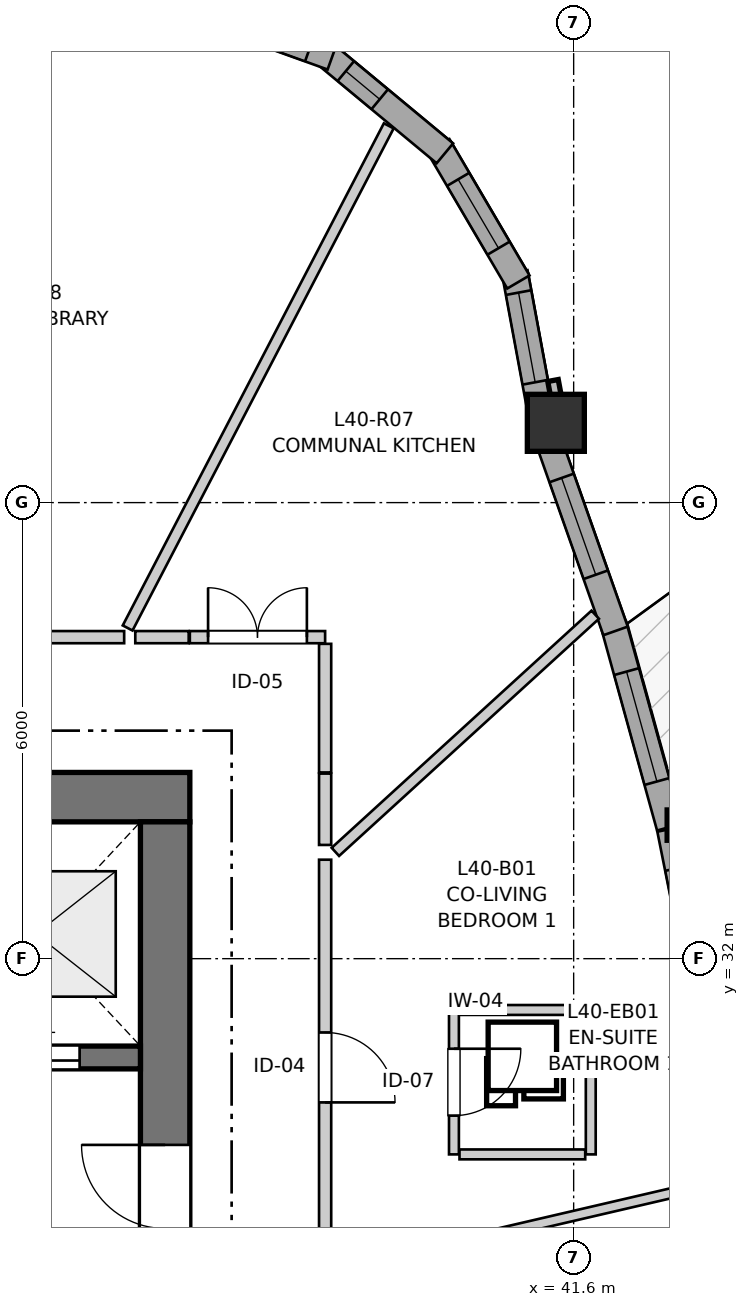
"""IFC4 building model, lengths in metres.
Left out: names, types, materials, properties, quantities, classifications, styles, units other than length and angle.
Written with IfcOpenShell. Run it as: python <this file> out.ifc"""

import sys

from ifc_helpers import new_model, si_unit, direction, frame, frame_2d, origin, origin_2d, place, context, subcontext, project, spatial, rectangle, i_section, extrude, source, transform, mapped, element, fill, save


model = new_model("IFC4")
c1 = context("Model", 3, precision=1e-05, world=origin(), true_north=direction((0.0, 1.0)))
c2 = subcontext(c1, "Body", "Model", "MODEL_VIEW")
j1 = project(units=[si_unit("LENGTHUNIT", "METRE"), si_unit("PLANEANGLEUNIT", "RADIAN")], contexts=[c1])
p1 = place(None, origin())
s1 = spatial("IfcSite", under=j1, at=p1, CompositionType="ELEMENT")
p2 = place(p1, origin())
s2 = spatial("IfcBuilding", under=s1, at=p2, CompositionType="ELEMENT")
p3 = place(p2, frame((0.0, 0.0, 136.2)))
s3 = spatial("IfcBuildingStorey", under=s2, at=p3, CompositionType="ELEMENT", Elevation=136.2)
p4 = place(p3, frame((36.55, 34.125, 0.0), z_axis=(0.0, 0.0, 1.0), x_axis=(-1.0, 0.0, 0.0)))
e1 = element("IfcWall", 1, at=p4, inside=s3, PredefinedType="SHEAR", context=c2, shape_type="SweptSolid", body=[
    extrude(rectangle(XDim=12.4, YDim=0.65, at=frame_2d((6.2, 0.0))), origin(), (0.0, 0.0, 1.0), 2.95),
])
p5 = place(p3, frame((36.225, 18.2, 0.0), z_axis=(0.0, 0.0, 1.0), x_axis=(0.0, 1.0, 0.0)))
e2 = element("IfcWall", 2, at=p5, inside=s3, PredefinedType="SHEAR", context=c2, shape_type="SweptSolid", body=[
    extrude(rectangle(XDim=15.6, YDim=0.65, at=frame_2d((7.8, 0.0))), origin(), (0.0, 0.0, 1.0), 2.95),
])
p6 = place(p5, frame((4.25, 0.0, 0.0)))
e3 = element("IfcOpeningElement", 3, at=p6, cuts=e2, PredefinedType="OPENING", context=c2, shape_type="SweptSolid", body=[
    extrude(rectangle(XDim=1.1, YDim=2.15, at=frame_2d((0.55, 1.075))), frame((0.0, 0.335, 0.0), z_axis=(0.0, -1.0, 0.0), x_axis=(1.0, 0.0, 0.0)), (0.0, 0.0, 1.0), 0.67),
])
p7 = place(p5, frame((10.25, 0.0, 0.0)))
e4 = element("IfcOpeningElement", 4, at=p7, cuts=e2, PredefinedType="OPENING", context=c2, shape_type="SweptSolid", body=[
    extrude(rectangle(XDim=1.1, YDim=2.15, at=frame_2d((0.55, 1.075))), frame((0.0, 0.335, 0.0), z_axis=(0.0, -1.0, 0.0), x_axis=(1.0, 0.0, 0.0)), (0.0, 0.0, 1.0), 0.67),
])
p8 = place(p3, frame((24.8, 30.7, 0.0), z_axis=(0.0, 0.0, 1.0), x_axis=(1.0, 0.0, 0.0)))
e5 = element("IfcWall", 5, at=p8, inside=s3, PredefinedType="SHEAR", context=c2, shape_type="SweptSolid", body=[
    extrude(rectangle(XDim=11.1, YDim=0.3, at=frame_2d((5.55, 0.0))), origin(), (0.0, 0.0, 1.0), 2.95),
])
p9 = place(p8, frame((6.22, 0.0, 0.0)))
e6 = element("IfcOpeningElement", 6, at=p9, cuts=e5, PredefinedType="OPENING", context=c2, shape_type="SweptSolid", body=[
    extrude(rectangle(XDim=0.98, YDim=2.15, at=frame_2d((0.49, 1.075))), frame((0.0, 0.16, 0.0), z_axis=(0.0, -1.0, 0.0), x_axis=(1.0, 0.0, 0.0)), (0.0, 0.0, 1.0), 0.32),
])
p10 = place(p8, frame((9.15, 0.0, 0.0)))
e7 = element("IfcOpeningElement", 7, at=p10, cuts=e5, PredefinedType="OPENING", context=c2, shape_type="SweptSolid", body=[
    extrude(rectangle(XDim=1.15, YDim=2.15, at=frame_2d((0.575, 1.075))), frame((0.0, 0.16, 0.0), z_axis=(0.0, -1.0, 0.0), x_axis=(1.0, 0.0, 0.0)), (0.0, 0.0, 1.0), 0.32),
])
m1 = source(origin(), c2, "Body", "SweptSolid", [
    extrude(i_section(OverallWidth=0.401, OverallDepth=0.399, WebThickness=0.023, FlangeThickness=0.036, FilletRadius=0.015, at=origin_2d()), origin(), (0.0, 0.0, 1.0), 2.95),
])
p11 = place(p3, frame((43.031, 33.757, 0.0), z_axis=(0.0, 0.0, 1.0), x_axis=(1.0, 0.0, 0.0)))
e8 = element("IfcColumn", 8, at=p11, inside=s3, PredefinedType="PILASTER", context=c2, shape_type="MappedRepresentation", body=[
    mapped(m1, transform((0.0, 0.0, 0.0), x_axis=(1.0, 0.0, 0.0), y_axis=(0.0, 1.0, 0.0), z_axis=(0.0, 0.0, 1.0), scale=1.0)),
])
m2 = source(origin(), c2, "Body", "SweptSolid", [
    extrude(rectangle(XDim=0.75, YDim=0.75, at=origin_2d()), origin(), (0.0, 0.0, 1.0), 2.95),
])
p12 = place(p3, frame((41.365, 39.05, 0.0), z_axis=(0.0, 0.0, 1.0), x_axis=(1.0, 0.0, 0.0)))
e9 = element("IfcColumn", 9, at=p12, inside=s3, PredefinedType="COLUMN", context=c2, shape_type="MappedRepresentation", body=[
    mapped(m2, transform((0.0, 0.0, 0.0), x_axis=(1.0, 0.0, 0.0), y_axis=(0.0, 1.0, 0.0), z_axis=(0.0, 0.0, 1.0), scale=1.0)),
])
p13 = place(p3, frame((43.401, 31.037, 0.0), z_axis=(0.0, 0.0, 1.0), x_axis=(-0.196047084538, 0.980594483283, 0.0)))
e10 = element("IfcWall", 10, at=p13, inside=s3, PredefinedType="SOLIDWALL", context=c2, shape_type="SweptSolid", body=[
    extrude(rectangle(XDim=2.72, YDim=0.34, at=frame_2d((1.36, 0.0))), origin(), (0.0, 0.0, 1.0), 2.53),
])
p14 = place(p13, frame((0.545, 0.0, 0.82)))
e11 = element("IfcOpeningElement", 11, at=p14, cuts=e10, PredefinedType="OPENING", context=c2, shape_type="SweptSolid", body=[
    extrude(rectangle(XDim=1.65, YDim=1.45, at=frame_2d((0.825, 0.725))), frame((0.0, 0.18, 0.0), z_axis=(0.0, -1.0, 0.0), x_axis=(1.0, 0.0, 0.0)), (0.0, 0.0, 1.0), 0.36),
])
p15 = place(p3, frame((42.861, 33.731, 0.0), z_axis=(0.0, 0.0, 1.0), x_axis=(-0.266277078362, 0.96389652844, 0.0)))
e12 = element("IfcWall", 12, at=p15, inside=s3, PredefinedType="SOLIDWALL", context=c2, shape_type="SweptSolid", body=[
    extrude(rectangle(XDim=2.764, YDim=0.34, at=frame_2d((1.382, 0.0))), origin(), (0.0, 0.0, 1.0), 2.53),
])
p16 = place(p15, frame((0.622, 0.0, 0.82)))
e13 = element("IfcOpeningElement", 13, at=p16, cuts=e12, PredefinedType="OPENING", context=c2, shape_type="SweptSolid", body=[
    extrude(rectangle(XDim=1.5, YDim=1.45, at=frame_2d((0.75, 0.725))), frame((0.0, 0.18, 0.0), z_axis=(0.0, -1.0, 0.0), x_axis=(1.0, 0.0, 0.0)), (0.0, 0.0, 1.0), 0.36),
])
p17 = place(p3, frame((42.151, 36.312, 0.0), z_axis=(0.0, 0.0, 1.0), x_axis=(-0.332691841861, 0.94303559761, 0.0)))
e14 = element("IfcWall", 14, at=p17, inside=s3, PredefinedType="SOLIDWALL", context=c2, shape_type="SweptSolid", body=[
    extrude(rectangle(XDim=2.688, YDim=0.34, at=frame_2d((1.344, 0.0))), origin(), (0.0, 0.0, 1.0), 2.53),
])
p18 = place(p17, frame((0.784, 0.0, 0.82)))
e15 = element("IfcOpeningElement", 15, at=p18, cuts=e14, PredefinedType="OPENING", context=c2, shape_type="SweptSolid", body=[
    extrude(rectangle(XDim=1.35, YDim=1.45, at=frame_2d((0.675, 0.725))), frame((0.0, 0.18, 0.0), z_axis=(0.0, -1.0, 0.0), x_axis=(1.0, 0.0, 0.0)), (0.0, 0.0, 1.0), 0.36),
])
p19 = place(p3, frame((41.17, 39.171, 0.0), z_axis=(0.0, 0.0, 1.0), x_axis=(-0.182297593262, 0.983243401956, 0.0)))
e16 = element("IfcWall", 16, at=p19, inside=s3, PredefinedType="SOLIDWALL", context=c2, shape_type="SweptSolid", body=[
    extrude(rectangle(XDim=1.888, YDim=0.34, at=frame_2d((0.944, 0.0))), origin(), (0.0, 0.0, 1.0), 2.53),
])
p20 = place(p19, frame((0.419, 0.0, 0.82)))
e17 = element("IfcOpeningElement", 17, at=p20, cuts=e16, PredefinedType="OPENING", context=c2, shape_type="SweptSolid", body=[
    extrude(rectangle(XDim=1.2, YDim=1.45, at=frame_2d((0.6, 0.725))), frame((0.0, 0.18, 0.0), z_axis=(0.0, -1.0, 0.0), x_axis=(1.0, 0.0, 0.0)), (0.0, 0.0, 1.0), 0.36),
])
p21 = place(p3, frame((40.873, 40.902, 0.0), z_axis=(0.0, 0.0, 1.0), x_axis=(-0.506225227923, 0.862401309493, 0.0)))
e18 = element("IfcWall", 18, at=p21, inside=s3, PredefinedType="SOLIDWALL", context=c2, shape_type="SweptSolid", body=[
    extrude(rectangle(XDim=2.081, YDim=0.34, at=frame_2d((1.041, 0.0))), origin(), (0.0, 0.0, 1.0), 2.53),
])
p22 = place(p21, frame((0.516, 0.0, 0.82)))
e19 = element("IfcOpeningElement", 19, at=p22, cuts=e18, PredefinedType="OPENING", context=c2, shape_type="SweptSolid", body=[
    extrude(rectangle(XDim=1.05, YDim=1.45, at=frame_2d((0.525, 0.725))), frame((0.0, 0.18, 0.0), z_axis=(0.0, -1.0, 0.0), x_axis=(1.0, 0.0, 0.0)), (0.0, 0.0, 1.0), 0.36),
])
p23 = place(p3, frame((39.906, 42.595, 0.0), z_axis=(0.0, 0.0, 1.0), x_axis=(-0.769584999316, 0.638544382817, 0.0)))
e20 = element("IfcWall", 20, at=p23, inside=s3, PredefinedType="SOLIDWALL", context=c2, shape_type="SweptSolid", body=[
    extrude(rectangle(XDim=2.081, YDim=0.34, at=frame_2d((1.041, 0.0))), origin(), (0.0, 0.0, 1.0), 2.53),
])
p24 = place(p23, frame((1.114, 0.0, 0.82)))
e21 = element("IfcOpeningElement", 21, at=p24, cuts=e20, PredefinedType="OPENING", context=c2, shape_type="SweptSolid", body=[
    extrude(rectangle(XDim=0.58, YDim=1.35, at=frame_2d((0.29, 0.675))), frame((0.0, 0.18, 0.0), z_axis=(0.0, -1.0, 0.0), x_axis=(1.0, 0.0, 0.0)), (0.0, 0.0, 1.0), 0.36),
])
p25 = place(p3, frame((38.42, 43.858, 0.0), z_axis=(0.0, 0.0, 1.0), x_axis=(-0.941071215914, 0.338208466153, 0.0)))
e22 = element("IfcWall", 22, at=p25, inside=s3, PredefinedType="SOLIDWALL", context=c2, shape_type="SweptSolid", body=[
    extrude(rectangle(XDim=2.081, YDim=0.34, at=frame_2d((1.041, 0.0))), origin(), (0.0, 0.0, 1.0), 2.53),
])
p26 = place(p25, frame((0.316, 0.0, 0.82)))
e23 = element("IfcOpeningElement", 23, at=p26, cuts=e22, PredefinedType="OPENING", context=c2, shape_type="SweptSolid", body=[
    extrude(rectangle(XDim=1.45, YDim=1.25, at=frame_2d((0.725, 0.625))), frame((0.0, 0.18, 0.0), z_axis=(0.0, -1.0, 0.0), x_axis=(1.0, 0.0, 0.0)), (0.0, 0.0, 1.0), 0.36),
])
p27 = place(p3, frame((30.078, 36.23, 0.0), z_axis=(0.0, 0.0, 1.0), x_axis=(1.0, 0.0, 0.0)))
e24 = element("IfcWall", 24, at=p27, inside=s3, PredefinedType="PARTITIONING", context=c2, shape_type="SweptSolid", body=[
    extrude(rectangle(XDim=5.608, YDim=0.16, at=frame_2d((2.804, 0.0))), origin(), (0.0, 0.0, 1.0), 2.588),
])
p28 = place(p27, frame((2.323, 0.0, 0.0)))
e25 = element("IfcOpeningElement", 25, at=p28, cuts=e24, PredefinedType="OPENING", context=c2, shape_type="SweptSolid", body=[
    extrude(rectangle(XDim=0.96, YDim=2.1, at=frame_2d((0.48, 1.05))), frame((0.0, 0.09, 0.0), z_axis=(0.0, -1.0, 0.0), x_axis=(1.0, 0.0, 0.0)), (0.0, 0.0, 1.0), 0.18),
])
p29 = place(p3, frame((38.33, 33.302, 0.0), z_axis=(0.0, 0.0, 1.0), x_axis=(0.0, -1.0, 0.0)))
e26 = element("IfcWall", 26, at=p29, inside=s3, PredefinedType="PARTITIONING", context=c2, shape_type="SweptSolid", body=[
    extrude(rectangle(XDim=5.462, YDim=0.16, at=frame_2d((2.731, 0.0))), origin(), (0.0, 0.0, 1.0), 2.588),
])
p30 = place(p29, frame((2.273, 0.0, 0.0)))
e27 = element("IfcOpeningElement", 27, at=p30, cuts=e26, PredefinedType="OPENING", context=c2, shape_type="SweptSolid", body=[
    extrude(rectangle(XDim=0.92, YDim=2.1, at=frame_2d((0.46, 1.05))), frame((0.0, 0.09, 0.0), z_axis=(0.0, -1.0, 0.0), x_axis=(1.0, 0.0, 0.0)), (0.0, 0.0, 1.0), 0.18),
])
p31 = place(p3, frame((40.025, 31.325, 0.0), z_axis=(0.0, 0.0, 1.0), x_axis=(0.0, -1.0, 0.0)))
e28 = element("IfcWall", 28, at=p31, inside=s3, PredefinedType="PARTITIONING", context=c2, shape_type="SweptSolid", body=[
    extrude(rectangle(XDim=1.9, YDim=0.13, at=frame_2d((0.95, 0.0))), origin(), (0.0, 0.0, 1.0), 2.95),
])
p32 = place(p31, frame((0.51, 0.0, 0.0)))
e29 = element("IfcOpeningElement", 29, at=p32, cuts=e28, PredefinedType="OPENING", context=c2, shape_type="SweptSolid", body=[
    extrude(rectangle(XDim=0.88, YDim=2.05, at=frame_2d((0.44, 1.025))), frame((0.0, 0.075, 0.0), z_axis=(0.0, -1.0, 0.0), x_axis=(1.0, 0.0, 0.0)), (0.0, 0.0, 1.0), 0.15),
])
p33 = place(p3, frame((36.55, 36.23, 0.0), z_axis=(0.0, 0.0, 1.0), x_axis=(1.0, 0.0, 0.0)))
e30 = element("IfcWall", 30, at=p33, inside=s3, PredefinedType="PARTITIONING", context=c2, shape_type="SweptSolid", body=[
    extrude(rectangle(XDim=1.78, YDim=0.16, at=frame_2d((0.89, 0.0))), origin(), (0.0, 0.0, 1.0), 2.95),
])
p34 = place(p33, frame((0.24, 0.0, 0.0)))
e31 = element("IfcOpeningElement", 31, at=p34, cuts=e30, PredefinedType="OPENING", context=c2, shape_type="SweptSolid", body=[
    extrude(rectangle(XDim=1.3, YDim=2.1, at=frame_2d((0.65, 1.05))), frame((0.0, 0.09, 0.0), z_axis=(0.0, -1.0, 0.0), x_axis=(1.0, 0.0, 0.0)), (0.0, 0.0, 1.0), 0.18),
])
p35 = place(p3, frame((35.732, 36.351, 0.0), z_axis=(0.0, 0.0, 1.0), x_axis=(0.461386804, 0.887199085378, 0.0)))
e32 = element("IfcWall", 32, at=p35, inside=s3, PredefinedType="PARTITIONING", context=c2, shape_type="SweptSolid", body=[
    extrude(rectangle(XDim=7.446, YDim=0.145, at=frame_2d((3.723, 0.0))), origin(), (0.0, 0.0, 1.0), 2.95),
])
p36 = place(p3, frame((38.433, 27.88, 0.0), z_axis=(0.0, 0.0, 1.0), x_axis=(0.974013368575, 0.226490524828, 0.0)))
e33 = element("IfcWall", 33, at=p36, inside=s3, PredefinedType="PARTITIONING", context=c2, shape_type="SweptSolid", body=[
    extrude(rectangle(XDim=5.159, YDim=0.13, at=frame_2d((2.58, 0.0))), origin(), (0.0, 0.0, 1.0), 2.95),
])
p37 = place(p3, frame((38.465, 33.405, 0.0), z_axis=(0.0, 0.0, 1.0), x_axis=(0.738623645331, 0.674118024205, 0.0)))
e34 = element("IfcWall", 34, at=p37, inside=s3, PredefinedType="PARTITIONING", context=c2, shape_type="SweptSolid", body=[
    extrude(rectangle(XDim=4.629, YDim=0.145, at=frame_2d((2.314, 0.0))), origin(), (0.0, 0.0, 1.0), 2.95),
])
p38 = place(p3, frame((41.825, 29.425, 0.0), z_axis=(0.0, 0.0, 1.0), x_axis=(0.0, 1.0, 0.0)))
e35 = element("IfcWall", 35, at=p38, inside=s3, PredefinedType="PARTITIONING", context=c2, shape_type="SweptSolid", body=[
    extrude(rectangle(XDim=1.9, YDim=0.13, at=frame_2d((0.95, 0.0))), origin(), (0.0, 0.0, 1.0), 2.95),
])
for number, where, z_axis, x_axis in (
    (36, (40.098, 31.325, 0.0), (0.0, 0.0, 1.0), (1.0, 0.0, 0.0)),
    (37, (40.098, 29.425, 0.0), (0.0, 0.0, 1.0), (1.0, 0.0, 0.0)),
):
    element("IfcWall", number, at=place(p3, frame(where, z_axis=z_axis, x_axis=x_axis)), inside=s3, PredefinedType="PARTITIONING", context=c2, shape_type="SweptSolid", body=[
        extrude(rectangle(XDim=1.654, YDim=0.13, at=frame_2d((0.827, 0.0))), origin(), (0.0, 0.0, 1.0), 2.95),
    ])
p39 = place(p3, frame((38.33, 34.45, 0.0), z_axis=(0.0, 0.0, 1.0), x_axis=(0.0, 1.0, 0.0)))
e38 = element("IfcWall", 38, at=p39, inside=s3, PredefinedType="PARTITIONING", context=c2, shape_type="SweptSolid", body=[
    extrude(rectangle(XDim=1.692, YDim=0.16, at=frame_2d((0.846, 0.0))), origin(), (0.0, 0.0, 1.0), 2.588),
])
p40 = place(p3, frame((38.33, 33.496, 0.0), z_axis=(0.0, 0.0, 1.0), x_axis=(0.0, 1.0, 0.0)))
e39 = element("IfcWall", 39, at=p40, inside=s3, PredefinedType="PARTITIONING", context=c2, shape_type="SweptSolid", body=[
    extrude(rectangle(XDim=0.939, YDim=0.16, at=frame_2d((0.469, 0.0))), origin(), (0.0, 0.0, 1.0), 2.588),
])
p41 = place(p3, frame((35.832, 36.23, 0.0), z_axis=(0.0, 0.0, 1.0), x_axis=(1.0, 0.0, 0.0)))
e40 = element("IfcWall", 40, at=p41, inside=s3, PredefinedType="PARTITIONING", context=c2, shape_type="SweptSolid", body=[
    extrude(rectangle(XDim=0.703, YDim=0.16, at=frame_2d((0.351, 0.0))), origin(), (0.0, 0.0, 1.0), 2.95),
])
m3 = source(origin(), c2, "Body", "SweptSolid", [
    extrude(rectangle(XDim=1.5, YDim=1.45, at=frame_2d((0.75, 0.725))), frame((0.0, 0.03, 0.0), z_axis=(0.0, -1.0, 0.0), x_axis=(1.0, 0.0, 0.0)), (0.0, 0.0, 1.0), 0.06),
])
p42 = place(p16, origin())
e41 = element("IfcWindow", 41, at=p42, inside=s3, PartitioningType="SINGLE_PANEL", PredefinedType="WINDOW", context=c2, shape_type="MappedRepresentation", body=[
    mapped(m3, transform((0.0, 0.0, 0.0), x_axis=(1.0, 0.0, 0.0), y_axis=(0.0, 1.0, 0.0), z_axis=(0.0, 0.0, 1.0), scale=1.0)),
])
fill(e13, e41)
m4 = source(origin(), c2, "Body", "SweptSolid", [
    extrude(rectangle(XDim=1.35, YDim=1.45, at=frame_2d((0.675, 0.725))), frame((0.0, 0.03, 0.0), z_axis=(0.0, -1.0, 0.0), x_axis=(1.0, 0.0, 0.0)), (0.0, 0.0, 1.0), 0.06),
])
p43 = place(p18, origin())
e42 = element("IfcWindow", 42, at=p43, inside=s3, PartitioningType="SINGLE_PANEL", PredefinedType="WINDOW", context=c2, shape_type="MappedRepresentation", body=[
    mapped(m4, transform((0.0, 0.0, 0.0), x_axis=(1.0, 0.0, 0.0), y_axis=(0.0, 1.0, 0.0), z_axis=(0.0, 0.0, 1.0), scale=1.0)),
])
fill(e15, e42)
m5 = source(origin(), c2, "Body", "SweptSolid", [
    extrude(rectangle(XDim=1.2, YDim=1.45, at=frame_2d((0.6, 0.725))), frame((0.0, 0.03, 0.0), z_axis=(0.0, -1.0, 0.0), x_axis=(1.0, 0.0, 0.0)), (0.0, 0.0, 1.0), 0.06),
])
p44 = place(p20, origin())
e43 = element("IfcWindow", 43, at=p44, inside=s3, PartitioningType="SINGLE_PANEL", PredefinedType="WINDOW", context=c2, shape_type="MappedRepresentation", body=[
    mapped(m5, transform((0.0, 0.0, 0.0), x_axis=(1.0, 0.0, 0.0), y_axis=(0.0, 1.0, 0.0), z_axis=(0.0, 0.0, 1.0), scale=1.0)),
])
fill(e17, e43)
m6 = source(origin(), c2, "Body", "SweptSolid", [
    extrude(rectangle(XDim=1.05, YDim=1.45, at=frame_2d((0.525, 0.725))), frame((0.0, 0.03, 0.0), z_axis=(0.0, -1.0, 0.0), x_axis=(1.0, 0.0, 0.0)), (0.0, 0.0, 1.0), 0.06),
])
p45 = place(p22, origin())
e44 = element("IfcWindow", 44, at=p45, inside=s3, PartitioningType="SINGLE_PANEL", PredefinedType="WINDOW", context=c2, shape_type="MappedRepresentation", body=[
    mapped(m6, transform((0.0, 0.0, 0.0), x_axis=(1.0, 0.0, 0.0), y_axis=(0.0, 1.0, 0.0), z_axis=(0.0, 0.0, 1.0), scale=1.0)),
])
fill(e19, e44)
m7 = source(origin(), c2, "Body", "SweptSolid", [
    extrude(rectangle(XDim=0.58, YDim=1.35, at=frame_2d((0.29, 0.675))), frame((0.0, 0.03, 0.0), z_axis=(0.0, -1.0, 0.0), x_axis=(1.0, 0.0, 0.0)), (0.0, 0.0, 1.0), 0.06),
])
p46 = place(p24, origin())
e45 = element("IfcWindow", 45, at=p46, inside=s3, PartitioningType="SINGLE_PANEL", PredefinedType="WINDOW", context=c2, shape_type="MappedRepresentation", body=[
    mapped(m7, transform((0.0, 0.0, 0.0), x_axis=(1.0, 0.0, 0.0), y_axis=(0.0, 1.0, 0.0), z_axis=(0.0, 0.0, 1.0), scale=1.0)),
])
fill(e21, e45)
m8 = source(origin(), c2, "Body", "SweptSolid", [
    extrude(rectangle(XDim=1.15, YDim=2.15, at=frame_2d((0.575, 1.075))), frame((0.0, 0.025, 0.0), z_axis=(0.0, -1.0, 0.0), x_axis=(1.0, 0.0, 0.0)), (0.0, 0.0, 1.0), 0.05),
])
p47 = place(p10, origin())
e46 = element("IfcDoor", 46, at=p47, inside=s3, OperationType="DOUBLE_DOOR_SLIDING", PredefinedType="DOOR", context=c2, shape_type="MappedRepresentation", body=[
    mapped(m8, transform((0.0, 0.0, 0.0), x_axis=(1.0, 0.0, 0.0), y_axis=(0.0, 1.0, 0.0), z_axis=(0.0, 0.0, 1.0), scale=1.0)),
])
fill(e7, e46)
m9 = source(origin(), c2, "Body", "SweptSolid", [
    extrude(rectangle(XDim=1.1, YDim=2.15, at=frame_2d((0.55, 1.075))), frame((0.0, 0.025, 0.0), z_axis=(0.0, -1.0, 0.0), x_axis=(1.0, 0.0, 0.0)), (0.0, 0.0, 1.0), 0.05),
])
p48 = place(p7, origin())
e47 = element("IfcDoor", 47, at=p48, inside=s3, OperationType="SINGLE_SWING_RIGHT", PredefinedType="DOOR", context=c2, shape_type="MappedRepresentation", body=[
    mapped(m9, transform((0.0, 0.0, 0.0), x_axis=(1.0, 0.0, 0.0), y_axis=(0.0, 1.0, 0.0), z_axis=(0.0, 0.0, 1.0), scale=1.0)),
])
fill(e4, e47)
m10 = source(origin(), c2, "Body", "SweptSolid", [
    extrude(rectangle(XDim=0.92, YDim=2.1, at=frame_2d((0.46, 1.05))), frame((0.0, 0.025, 0.0), z_axis=(0.0, -1.0, 0.0), x_axis=(1.0, 0.0, 0.0)), (0.0, 0.0, 1.0), 0.05),
])
p49 = place(p30, origin())
e48 = element("IfcDoor", 48, at=p49, inside=s3, OperationType="SINGLE_SWING_RIGHT", PredefinedType="DOOR", context=c2, shape_type="MappedRepresentation", body=[
    mapped(m10, transform((0.0, 0.0, 0.0), x_axis=(1.0, 0.0, 0.0), y_axis=(0.0, 1.0, 0.0), z_axis=(0.0, 0.0, 1.0), scale=1.0)),
])
fill(e27, e48)
m11 = source(origin(), c2, "Body", "SweptSolid", [
    extrude(rectangle(XDim=0.88, YDim=2.05, at=frame_2d((0.44, 1.025))), frame((0.0, 0.025, 0.0), z_axis=(0.0, -1.0, 0.0), x_axis=(1.0, 0.0, 0.0)), (0.0, 0.0, 1.0), 0.05),
])
p50 = place(p32, origin())
e49 = element("IfcDoor", 49, at=p50, inside=s3, OperationType="SINGLE_SWING_LEFT", PredefinedType="DOOR", context=c2, shape_type="MappedRepresentation", body=[
    mapped(m11, transform((0.0, 0.0, 0.0), x_axis=(1.0, 0.0, 0.0), y_axis=(0.0, 1.0, 0.0), z_axis=(0.0, 0.0, 1.0), scale=1.0)),
])
fill(e29, e49)
m12 = source(origin(), c2, "Body", "SweptSolid", [
    extrude(rectangle(XDim=1.3, YDim=2.1, at=frame_2d((0.65, 1.05))), frame((0.0, 0.025, 0.0), z_axis=(0.0, -1.0, 0.0), x_axis=(1.0, 0.0, 0.0)), (0.0, 0.0, 1.0), 0.05),
])
p51 = place(p34, origin())
e50 = element("IfcDoor", 50, at=p51, inside=s3, OperationType="DOUBLE_DOOR_SINGLE_SWING", PredefinedType="DOOR", context=c2, shape_type="MappedRepresentation", body=[
    mapped(m12, transform((0.0, 0.0, 0.0), x_axis=(1.0, 0.0, 0.0), y_axis=(0.0, 1.0, 0.0), z_axis=(0.0, 0.0, 1.0), scale=1.0)),
])
fill(e31, e50)
save(model, sys.argv[1])
